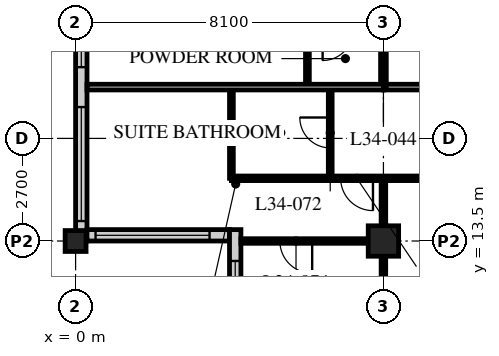
"""IFC4 building model, lengths in metres.
Left out: names, types, materials, properties, quantities, classifications, styles, units other than length and angle.
Written with IfcOpenShell. Run it as: python <this file> out.ifc"""

import sys

from ifc_helpers import new_model, si_unit, direction, frame, frame_2d, origin, origin_2d, place, context, subcontext, project, spatial, rectangle, hollow_rectangle, extrude, element, fill, save


model = new_model("IFC4")
c1 = context("Model", 3, precision=1e-05, world=origin(), true_north=direction((0.0, 1.0)))
c2 = subcontext(c1, "Body", "Model", "MODEL_VIEW")
j1 = project(units=[si_unit("LENGTHUNIT", "METRE"), si_unit("PLANEANGLEUNIT", "RADIAN")], contexts=[c1])
p1 = place(None, origin())
s1 = spatial("IfcSite", under=j1, at=p1, CompositionType="ELEMENT")
p2 = place(p1, origin())
s2 = spatial("IfcBuilding", under=s1, at=p2, CompositionType="ELEMENT")
p3 = place(p2, frame((0.0, 0.0, 134.0)))
s3 = spatial("IfcBuildingStorey", under=s2, at=p3, CompositionType="ELEMENT", Elevation=134.0)
p4 = place(p3, frame((0.0, 13.5, 0.0), z_axis=(0.0, 0.0, 1.0), x_axis=(1.0, 0.0, 0.0)))
e1 = element("IfcColumn", 1, at=p4, inside=s3, PredefinedType="COLUMN", context=c2, shape_type="SweptSolid", body=[
    extrude(hollow_rectangle(XDim=0.55, YDim=0.55, WallThickness=0.04, at=origin_2d()), origin(), (0.0, 0.0, 1.0), 3.4),
])
p5 = place(p3, frame((8.1, 13.5, 0.0), z_axis=(0.0, 0.0, 1.0), x_axis=(1.0, 0.0, 0.0)))
e2 = element("IfcColumn", 2, at=p5, inside=s3, PredefinedType="COLUMN", context=c2, shape_type="SweptSolid", body=[
    extrude(hollow_rectangle(XDim=0.8, YDim=0.8, WallThickness=0.08, at=origin_2d()), origin(), (0.0, 0.0, 1.0), 3.4),
])
p6 = place(p3, frame((0.15, 45.6, 0.0), z_axis=(0.0, 0.0, 1.0), x_axis=(0.0, -1.0, 0.0)))
e3 = element("IfcWall", 3, at=p6, inside=s3, PredefinedType="SOLIDWALL", context=c2, shape_type="SweptSolid", body=[
    extrude(rectangle(XDim=32.1, YDim=0.3, at=frame_2d((16.05, 0.0))), origin(), (0.0, 0.0, 1.0), 3.19),
])
p7 = place(p6, frame((0.225, 0.0, 0.9)))
e4 = element("IfcOpeningElement", 4, at=p7, cuts=e3, PredefinedType="OPENING", context=c2, shape_type="SweptSolid", body=[
    extrude(rectangle(XDim=3.0, YDim=2.0, at=frame_2d((1.5, 1.0))), frame((0.0, 0.16, 0.0), z_axis=(0.0, -1.0, 0.0), x_axis=(1.0, 0.0, 0.0)), (0.0, 0.0, 1.0), 0.32),
])
p8 = place(p6, frame((4.275, 0.0, 0.9)))
e5 = element("IfcOpeningElement", 5, at=p8, cuts=e3, PredefinedType="OPENING", context=c2, shape_type="SweptSolid", body=[
    extrude(rectangle(XDim=3.0, YDim=2.0, at=frame_2d((1.5, 1.0))), frame((0.0, 0.16, 0.0), z_axis=(0.0, -1.0, 0.0), x_axis=(1.0, 0.0, 0.0)), (0.0, 0.0, 1.0), 0.32),
])
p9 = place(p6, frame((8.325, 0.0, 0.9)))
e6 = element("IfcOpeningElement", 6, at=p9, cuts=e3, PredefinedType="OPENING", context=c2, shape_type="SweptSolid", body=[
    extrude(rectangle(XDim=3.0, YDim=2.0, at=frame_2d((1.5, 1.0))), frame((0.0, 0.16, 0.0), z_axis=(0.0, -1.0, 0.0), x_axis=(1.0, 0.0, 0.0)), (0.0, 0.0, 1.0), 0.32),
])
p10 = place(p6, frame((12.375, 0.0, 0.9)))
e7 = element("IfcOpeningElement", 7, at=p10, cuts=e3, PredefinedType="OPENING", context=c2, shape_type="SweptSolid", body=[
    extrude(rectangle(XDim=3.0, YDim=2.0, at=frame_2d((1.5, 1.0))), frame((0.0, 0.16, 0.0), z_axis=(0.0, -1.0, 0.0), x_axis=(1.0, 0.0, 0.0)), (0.0, 0.0, 1.0), 0.32),
])
p11 = place(p6, frame((16.425, 0.0, 0.9)))
e8 = element("IfcOpeningElement", 8, at=p11, cuts=e3, PredefinedType="OPENING", context=c2, shape_type="SweptSolid", body=[
    extrude(rectangle(XDim=3.0, YDim=2.0, at=frame_2d((1.5, 1.0))), frame((0.0, 0.16, 0.0), z_axis=(0.0, -1.0, 0.0), x_axis=(1.0, 0.0, 0.0)), (0.0, 0.0, 1.0), 0.32),
])
p12 = place(p6, frame((20.475, 0.0, 0.9)))
e9 = element("IfcOpeningElement", 9, at=p12, cuts=e3, PredefinedType="OPENING", context=c2, shape_type="SweptSolid", body=[
    extrude(rectangle(XDim=3.0, YDim=2.0, at=frame_2d((1.5, 1.0))), frame((0.0, 0.16, 0.0), z_axis=(0.0, -1.0, 0.0), x_axis=(1.0, 0.0, 0.0)), (0.0, 0.0, 1.0), 0.32),
])
p13 = place(p6, frame((24.525, 0.0, 0.9)))
e10 = element("IfcOpeningElement", 10, at=p13, cuts=e3, PredefinedType="OPENING", context=c2, shape_type="SweptSolid", body=[
    extrude(rectangle(XDim=3.0, YDim=2.0, at=frame_2d((1.5, 1.0))), frame((0.0, 0.16, 0.0), z_axis=(0.0, -1.0, 0.0), x_axis=(1.0, 0.0, 0.0)), (0.0, 0.0, 1.0), 0.32),
])
p14 = place(p6, frame((28.575, 0.0, 0.9)))
e11 = element("IfcOpeningElement", 11, at=p14, cuts=e3, PredefinedType="OPENING", context=c2, shape_type="SweptSolid", body=[
    extrude(rectangle(XDim=3.0, YDim=2.0, at=frame_2d((1.5, 1.0))), frame((0.0, 0.16, 0.0), z_axis=(0.0, -1.0, 0.0), x_axis=(1.0, 0.0, 0.0)), (0.0, 0.0, 1.0), 0.32),
])
p15 = place(p3, frame((0.3, 13.65, 0.0), z_axis=(0.0, 0.0, 1.0), x_axis=(1.0, 0.0, 0.0)))
e12 = element("IfcWall", 12, at=p15, inside=s3, PredefinedType="SOLIDWALL", context=c2, shape_type="SweptSolid", body=[
    extrude(rectangle(XDim=3.75, YDim=0.3, at=frame_2d((1.875, 0.0))), origin(), (0.0, 0.0, 1.0), 3.19),
])
p16 = place(p15, frame((0.225, 0.0, 0.9)))
e13 = element("IfcOpeningElement", 13, at=p16, cuts=e12, PredefinedType="OPENING", context=c2, shape_type="SweptSolid", body=[
    extrude(rectangle(XDim=3.0, YDim=1.5, at=frame_2d((1.5, 0.75))), frame((0.0, 0.16, 0.0), z_axis=(0.0, -1.0, 0.0), x_axis=(1.0, 0.0, 0.0)), (0.0, 0.0, 1.0), 0.32),
])
p17 = place(p3, frame((4.2, 13.8, 0.0), z_axis=(0.0, 0.0, 1.0), x_axis=(0.0, -1.0, 0.0)))
e14 = element("IfcWall", 14, at=p17, inside=s3, PredefinedType="SOLIDWALL", context=c2, shape_type="SweptSolid", body=[
    extrude(rectangle(XDim=4.35, YDim=0.3, at=frame_2d((2.175, 0.0))), origin(), (0.0, 0.0, 1.0), 3.19),
])
p18 = place(p17, frame((0.825, 0.0, 0.9)))
e15 = element("IfcOpeningElement", 15, at=p18, cuts=e14, PredefinedType="OPENING", context=c2, shape_type="SweptSolid", body=[
    extrude(rectangle(XDim=3.0, YDim=1.5, at=frame_2d((1.5, 0.75))), frame((0.0, 0.16, 0.0), z_axis=(0.0, -1.0, 0.0), x_axis=(1.0, 0.0, 0.0)), (0.0, 0.0, 1.0), 0.32),
])
p19 = place(p3, frame((8.1, 17.55, 0.0), z_axis=(0.0, 0.0, 1.0), x_axis=(1.0, 0.0, 0.0)))
e16 = element("IfcWall", 16, at=p19, inside=s3, PredefinedType="PARTITIONING", context=c2, shape_type="SweptSolid", body=[
    extrude(rectangle(XDim=36.45, YDim=0.15, at=frame_2d((18.225, 0.0))), origin(), (0.0, 0.0, 1.0), 3.19),
])
p20 = place(p19, frame((9.625, 0.0, 0.0)))
e17 = element("IfcOpeningElement", 17, at=p20, cuts=e16, PredefinedType="OPENING", context=c2, shape_type="SweptSolid", body=[
    extrude(rectangle(XDim=1.0, YDim=2.1, at=frame_2d((0.5, 1.05))), frame((0.0, 0.085, 0.0), z_axis=(0.0, -1.0, 0.0), x_axis=(1.0, 0.0, 0.0)), (0.0, 0.0, 1.0), 0.17),
])
p21 = place(p19, frame((18.1, 0.0, 0.0)))
e18 = element("IfcOpeningElement", 18, at=p21, cuts=e16, PredefinedType="OPENING", context=c2, shape_type="SweptSolid", body=[
    extrude(rectangle(XDim=1.0, YDim=2.1, at=frame_2d((0.5, 1.05))), frame((0.0, 0.085, 0.0), z_axis=(0.0, -1.0, 0.0), x_axis=(1.0, 0.0, 0.0)), (0.0, 0.0, 1.0), 0.17),
])
p22 = place(p19, frame((26.75, 0.0, 0.0)))
e19 = element("IfcOpeningElement", 19, at=p22, cuts=e16, PredefinedType="OPENING", context=c2, shape_type="SweptSolid", body=[
    extrude(rectangle(XDim=1.0, YDim=2.1, at=frame_2d((0.5, 1.05))), frame((0.0, 0.085, 0.0), z_axis=(0.0, -1.0, 0.0), x_axis=(1.0, 0.0, 0.0)), (0.0, 0.0, 1.0), 0.17),
])
p23 = place(p19, frame((30.8, 0.0, 0.0)))
e20 = element("IfcOpeningElement", 20, at=p23, cuts=e16, PredefinedType="OPENING", context=c2, shape_type="SweptSolid", body=[
    extrude(rectangle(XDim=1.0, YDim=2.1, at=frame_2d((0.5, 1.05))), frame((0.0, 0.085, 0.0), z_axis=(0.0, -1.0, 0.0), x_axis=(1.0, 0.0, 0.0)), (0.0, 0.0, 1.0), 0.17),
])
p24 = place(p19, frame((1.525, 0.0, 0.0)))
e21 = element("IfcOpeningElement", 21, at=p24, cuts=e16, PredefinedType="OPENING", context=c2, shape_type="SweptSolid", body=[
    extrude(rectangle(XDim=1.0, YDim=2.1, at=frame_2d((0.5, 1.05))), frame((0.0, 0.085, 0.0), z_axis=(0.0, -1.0, 0.0), x_axis=(1.0, 0.0, 0.0)), (0.0, 0.0, 1.0), 0.17),
])
p25 = place(p19, frame((33.925, 0.0, 0.0)))
e22 = element("IfcOpeningElement", 22, at=p25, cuts=e16, PredefinedType="OPENING", context=c2, shape_type="SweptSolid", body=[
    extrude(rectangle(XDim=1.0, YDim=2.1, at=frame_2d((0.5, 1.05))), frame((0.0, 0.085, 0.0), z_axis=(0.0, -1.0, 0.0), x_axis=(1.0, 0.0, 0.0)), (0.0, 0.0, 1.0), 0.17),
])
p26 = place(p3, frame((8.1, 17.55, 0.0), z_axis=(0.0, 0.0, 1.0), x_axis=(0.0, 1.0, 0.0)))
e23 = element("IfcWall", 23, at=p26, inside=s3, PredefinedType="PARTITIONING", context=c2, shape_type="SweptSolid", body=[
    extrude(rectangle(XDim=28.35, YDim=0.15, at=frame_2d((14.175, 0.0))), origin(), (0.0, 0.0, 1.0), 2.578),
])
p27 = place(p26, frame((1.9, 0.0, 0.0)))
e24 = element("IfcOpeningElement", 24, at=p27, cuts=e23, PredefinedType="OPENING", context=c2, shape_type="SweptSolid", body=[
    extrude(rectangle(XDim=1.0, YDim=2.1, at=frame_2d((0.5, 1.05))), frame((0.0, 0.085, 0.0), z_axis=(0.0, -1.0, 0.0), x_axis=(1.0, 0.0, 0.0)), (0.0, 0.0, 1.0), 0.17),
])
p28 = place(p26, frame((10.0, 0.0, 0.0)))
e25 = element("IfcOpeningElement", 25, at=p28, cuts=e23, PredefinedType="OPENING", context=c2, shape_type="SweptSolid", body=[
    extrude(rectangle(XDim=1.0, YDim=2.1, at=frame_2d((0.5, 1.05))), frame((0.0, 0.085, 0.0), z_axis=(0.0, -1.0, 0.0), x_axis=(1.0, 0.0, 0.0)), (0.0, 0.0, 1.0), 0.17),
])
p29 = place(p26, frame((18.1, 0.0, 0.0)))
e26 = element("IfcOpeningElement", 26, at=p29, cuts=e23, PredefinedType="OPENING", context=c2, shape_type="SweptSolid", body=[
    extrude(rectangle(XDim=1.0, YDim=2.1, at=frame_2d((0.5, 1.05))), frame((0.0, 0.085, 0.0), z_axis=(0.0, -1.0, 0.0), x_axis=(1.0, 0.0, 0.0)), (0.0, 0.0, 1.0), 0.17),
])
p30 = place(p26, frame((24.9, 0.0, 0.0)))
e27 = element("IfcOpeningElement", 27, at=p30, cuts=e23, PredefinedType="OPENING", context=c2, shape_type="SweptSolid", body=[
    extrude(rectangle(XDim=1.0, YDim=2.1, at=frame_2d((0.5, 1.05))), frame((0.0, 0.085, 0.0), z_axis=(0.0, -1.0, 0.0), x_axis=(1.0, 0.0, 0.0)), (0.0, 0.0, 1.0), 0.17),
])
p31 = place(p3, frame((6.1, 17.55, 0.0), z_axis=(0.0, 0.0, 1.0), x_axis=(0.0, 1.0, 0.0)))
e28 = element("IfcWall", 28, at=p31, inside=s3, PredefinedType="PARTITIONING", context=c2, shape_type="SweptSolid", body=[
    extrude(rectangle(XDim=1.5, YDim=0.1, at=frame_2d((0.75, 0.0))), origin(), (0.0, 0.0, 1.0), 3.19),
])
p32 = place(p3, frame((6.7, 17.55, 0.0), z_axis=(0.0, 0.0, 1.0), x_axis=(0.0, -1.0, 0.0)))
e29 = element("IfcWall", 29, at=p32, inside=s3, PredefinedType="PARTITIONING", context=c2, shape_type="SweptSolid", body=[
    extrude(rectangle(XDim=2.4, YDim=0.1, at=frame_2d((1.2, 0.0))), origin(), (0.0, 0.0, 1.0), 3.19),
])
p33 = place(p32, frame((0.8, 0.0, 0.0)))
e30 = element("IfcOpeningElement", 30, at=p33, cuts=e29, PredefinedType="OPENING", context=c2, shape_type="SweptSolid", body=[
    extrude(rectangle(XDim=0.8, YDim=2.1, at=frame_2d((0.4, 1.05))), frame((0.0, 0.06, 0.0), z_axis=(0.0, -1.0, 0.0), x_axis=(1.0, 0.0, 0.0)), (0.0, 0.0, 1.0), 0.12),
])
p34 = place(p3, frame((4.1, 17.55, 0.0), z_axis=(0.0, 0.0, 1.0), x_axis=(0.0, -1.0, 0.0)))
e31 = element("IfcWall", 31, at=p34, inside=s3, PredefinedType="PARTITIONING", context=c2, shape_type="SweptSolid", body=[
    extrude(rectangle(XDim=2.4, YDim=0.1, at=frame_2d((1.2, 0.0))), origin(), (0.0, 0.0, 1.0), 3.19),
])
p35 = place(p3, frame((4.1, 15.15, 0.0), z_axis=(0.0, 0.0, 1.0), x_axis=(1.0, 0.0, 0.0)))
e32 = element("IfcWall", 32, at=p35, inside=s3, PredefinedType="PARTITIONING", context=c2, shape_type="SweptSolid", body=[
    extrude(rectangle(XDim=8.05, YDim=0.12, at=frame_2d((4.025, 0.0))), origin(), (0.0, 0.0, 1.0), 3.19),
])
p36 = place(p35, frame((6.725, 0.0, 0.0)))
e33 = element("IfcOpeningElement", 33, at=p36, cuts=e32, PredefinedType="OPENING", context=c2, shape_type="SweptSolid", body=[
    extrude(rectangle(XDim=0.85, YDim=2.1, at=frame_2d((0.425, 1.05))), frame((0.0, 0.07, 0.0), z_axis=(0.0, -1.0, 0.0), x_axis=(1.0, 0.0, 0.0)), (0.0, 0.0, 1.0), 0.14),
])
p37 = place(p35, frame((2.875, 0.0, 0.0)))
e34 = element("IfcOpeningElement", 34, at=p37, cuts=e32, PredefinedType="OPENING", context=c2, shape_type="SweptSolid", body=[
    extrude(rectangle(XDim=0.85, YDim=2.1, at=frame_2d((0.425, 1.05))), frame((0.0, 0.07, 0.0), z_axis=(0.0, -1.0, 0.0), x_axis=(1.0, 0.0, 0.0)), (0.0, 0.0, 1.0), 0.14),
])
p38 = place(p3, frame((8.1, 15.15, 0.0), z_axis=(0.0, 0.0, 1.0), x_axis=(0.0, -1.0, 0.0)))
e35 = element("IfcWall", 35, at=p38, inside=s3, PredefinedType="PARTITIONING", context=c2, shape_type="SweptSolid", body=[
    extrude(rectangle(XDim=5.4, YDim=0.12, at=frame_2d((2.7, 0.0))), origin(), (0.0, 0.0, 1.0), 2.578),
])
p39 = place(p3, frame((8.1, 13.5, 0.0), z_axis=(0.0, 0.0, 1.0), x_axis=(-1.0, 0.0, 0.0)))
e36 = element("IfcWall", 36, at=p39, inside=s3, PredefinedType="PARTITIONING", context=c2, shape_type="SweptSolid", body=[
    extrude(rectangle(XDim=3.75, YDim=0.12, at=frame_2d((1.875, 0.0))), origin(), (0.0, 0.0, 1.0), 2.578),
])
p40 = place(p39, frame((1.875, 0.0, 0.0)))
e37 = element("IfcOpeningElement", 37, at=p40, cuts=e36, PredefinedType="OPENING", context=c2, shape_type="SweptSolid", body=[
    extrude(rectangle(XDim=0.85, YDim=2.1, at=frame_2d((0.425, 1.05))), frame((0.0, 0.07, 0.0), z_axis=(0.0, -1.0, 0.0), x_axis=(1.0, 0.0, 0.0)), (0.0, 0.0, 1.0), 0.14),
])
p41 = place(p3, frame((0.3, 17.55, 0.0), z_axis=(0.0, 0.0, 1.0), x_axis=(1.0, 0.0, 0.0)))
e38 = element("IfcWall", 38, at=p41, inside=s3, PredefinedType="PARTITIONING", context=c2, shape_type="SweptSolid", body=[
    extrude(rectangle(XDim=7.8, YDim=0.15, at=frame_2d((3.9, 0.0))), origin(), (0.0, 0.0, 1.0), 3.19),
])
p42 = place(p13, origin())
e39 = element("IfcWindow", 39, at=p42, inside=s3, PartitioningType="SINGLE_PANEL", PredefinedType="WINDOW", context=c2, shape_type="SweptSolid", body=[
    extrude(rectangle(XDim=3.0, YDim=2.0, at=frame_2d((1.5, 1.0))), frame((0.0, 0.03, 0.0), z_axis=(0.0, -1.0, 0.0), x_axis=(1.0, 0.0, 0.0)), (0.0, 0.0, 1.0), 0.06),
])
fill(e10, e39)
p43 = place(p14, origin())
e40 = element("IfcWindow", 40, at=p43, inside=s3, PartitioningType="SINGLE_PANEL", PredefinedType="WINDOW", context=c2, shape_type="SweptSolid", body=[
    extrude(rectangle(XDim=3.0, YDim=2.0, at=frame_2d((1.5, 1.0))), frame((0.0, 0.03, 0.0), z_axis=(0.0, -1.0, 0.0), x_axis=(1.0, 0.0, 0.0)), (0.0, 0.0, 1.0), 0.06),
])
fill(e11, e40)
p44 = place(p16, origin())
e41 = element("IfcWindow", 41, at=p44, inside=s3, PartitioningType="SINGLE_PANEL", PredefinedType="WINDOW", context=c2, shape_type="SweptSolid", body=[
    extrude(rectangle(XDim=3.0, YDim=1.5, at=frame_2d((1.5, 0.75))), frame((0.0, 0.03, 0.0), z_axis=(0.0, -1.0, 0.0), x_axis=(1.0, 0.0, 0.0)), (0.0, 0.0, 1.0), 0.06),
])
fill(e13, e41)
p45 = place(p18, origin())
e42 = element("IfcWindow", 42, at=p45, inside=s3, PartitioningType="SINGLE_PANEL", PredefinedType="WINDOW", context=c2, shape_type="SweptSolid", body=[
    extrude(rectangle(XDim=3.0, YDim=1.5, at=frame_2d((1.5, 0.75))), frame((0.0, 0.03, 0.0), z_axis=(0.0, -1.0, 0.0), x_axis=(1.0, 0.0, 0.0)), (0.0, 0.0, 1.0), 0.06),
])
fill(e15, e42)
p46 = place(p33, origin())
e43 = element("IfcDoor", 43, at=p46, inside=s3, OperationType="SINGLE_SWING_RIGHT", PredefinedType="DOOR", context=c2, shape_type="SweptSolid", body=[
    extrude(rectangle(XDim=0.8, YDim=2.1, at=frame_2d((0.4, 1.05))), frame((0.0, 0.025, 0.0), z_axis=(0.0, -1.0, 0.0), x_axis=(1.0, 0.0, 0.0)), (0.0, 0.0, 1.0), 0.05),
])
fill(e30, e43)
p47 = place(p37, origin())
e44 = element("IfcDoor", 44, at=p47, inside=s3, OperationType="SINGLE_SWING_LEFT", PredefinedType="DOOR", context=c2, shape_type="SweptSolid", body=[
    extrude(rectangle(XDim=0.85, YDim=2.1, at=frame_2d((0.425, 1.05))), frame((0.0, 0.025, 0.0), z_axis=(0.0, -1.0, 0.0), x_axis=(1.0, 0.0, 0.0)), (0.0, 0.0, 1.0), 0.05),
])
fill(e34, e44)
p48 = place(p40, origin())
e45 = element("IfcDoor", 45, at=p48, inside=s3, OperationType="SINGLE_SWING_LEFT", PredefinedType="DOOR", context=c2, shape_type="SweptSolid", body=[
    extrude(rectangle(XDim=0.85, YDim=2.1, at=frame_2d((0.425, 1.05))), frame((0.0, 0.025, 0.0), z_axis=(0.0, -1.0, 0.0), x_axis=(1.0, 0.0, 0.0)), (0.0, 0.0, 1.0), 0.05),
])
fill(e37, e45)
save(model, sys.argv[1])
